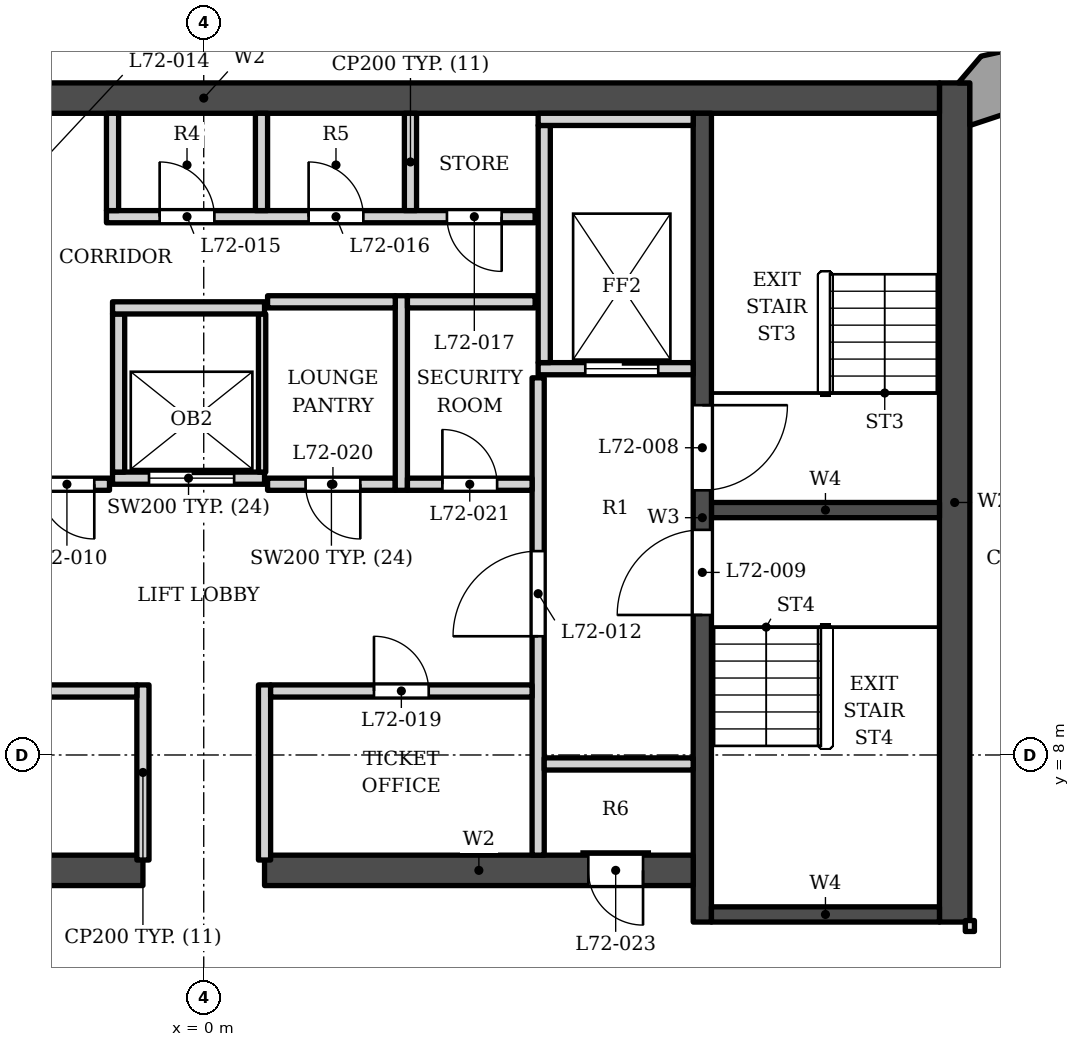
"""IFC4 building model, lengths in metres.
Left out: names, types, materials, properties, quantities, classifications, styles, units other than length and angle.
Written with IfcOpenShell. Run it as: python <this file> out.ifc"""

import sys

from ifc_helpers import new_model, si_unit, direction, frame, frame_2d, origin, place, context, subcontext, project, spatial, polyline, rectangle, outline, extrude, element, fill, save


model = new_model("IFC4")
c1 = context("Model", 3, precision=1e-05, world=origin(), true_north=direction((0.0, 1.0)))
c2 = subcontext(c1, "Body", "Model", "MODEL_VIEW")
j1 = project(units=[si_unit("LENGTHUNIT", "METRE"), si_unit("PLANEANGLEUNIT", "RADIAN")], contexts=[c1])
p1 = place(None, origin())
s1 = spatial("IfcSite", under=j1, at=p1, CompositionType="ELEMENT")
p2 = place(p1, origin())
s2 = spatial("IfcBuilding", under=s1, at=p2, CompositionType="ELEMENT")
p3 = place(p2, frame((0.0, 0.0, 302.5)))
s3 = spatial("IfcBuildingStorey", under=s2, at=p3, CompositionType="ELEMENT", Elevation=302.5)
p4 = place(p3, frame((-12.1, 18.802, 0.0), z_axis=(0.0, 0.0, 1.0), x_axis=(1.0, 0.0, 0.0)))
e1 = element("IfcWall", 1, at=p4, inside=s3, PredefinedType="SHEAR", context=c2, shape_type="SweptSolid", body=[
    extrude(rectangle(XDim=24.2, YDim=0.5, at=frame_2d((12.1, 0.0))), origin(), (0.0, 0.0, 1.0), 8.0),
])
p5 = place(p3, frame((12.35, 5.253, 0.0), z_axis=(0.0, 0.0, 1.0), x_axis=(0.0, 1.0, 0.0)))
e2 = element("IfcWall", 2, at=p5, inside=s3, PredefinedType="SHEAR", context=c2, shape_type="SweptSolid", body=[
    extrude(rectangle(XDim=13.8, YDim=0.5, at=frame_2d((6.9, 0.0))), origin(), (0.0, 0.0, 1.0), 8.0),
])
p6 = place(p3, frame((8.2, 5.253, 0.0), z_axis=(0.0, 0.0, 1.0), x_axis=(0.0, 1.0, 0.0)))
e3 = element("IfcWall", 3, at=p6, inside=s3, PredefinedType="SHEAR", context=c2, shape_type="SweptSolid", body=[
    extrude(rectangle(XDim=13.3, YDim=0.3, at=frame_2d((6.65, 0.0))), origin(), (0.0, 0.0, 1.0), 8.0),
])
p7 = place(p6, frame((7.1, 0.0, 0.0)))
e4 = element("IfcOpeningElement", 4, at=p7, cuts=e3, PredefinedType="OPENING", context=c2, shape_type="SweptSolid", body=[
    extrude(rectangle(XDim=1.4, YDim=2.1, at=frame_2d((0.7, 1.05))), frame((0.0, 0.16, 0.0), z_axis=(0.0, -1.0, 0.0), x_axis=(1.0, 0.0, 0.0)), (0.0, 0.0, 1.0), 0.32),
])
p8 = place(p6, frame((5.05, 0.0, 0.0)))
e5 = element("IfcOpeningElement", 5, at=p8, cuts=e3, PredefinedType="OPENING", context=c2, shape_type="SweptSolid", body=[
    extrude(rectangle(XDim=1.4, YDim=2.1, at=frame_2d((0.7, 1.05))), frame((0.0, 0.16, 0.0), z_axis=(0.0, -1.0, 0.0), x_axis=(1.0, 0.0, 0.0)), (0.0, 0.0, 1.0), 0.32),
])
for number, where, z_axis, x_axis in (
    (6, (8.35, 12.028, 0.0), (0.0, 0.0, 1.0), (1.0, 0.0, 0.0)),
    (7, (8.35, 5.378, 0.0), (0.0, 0.0, 1.0), (1.0, 0.0, 0.0)),
):
    element("IfcWall", number, at=place(p3, frame(where, z_axis=z_axis, x_axis=x_axis)), inside=s3, PredefinedType="SHEAR", context=c2, shape_type="SweptSolid", body=[
        extrude(rectangle(XDim=3.75, YDim=0.25, at=frame_2d((1.875, 0.0))), origin(), (0.0, 0.0, 1.0), 8.0),
    ])
p9 = place(p3, frame((-8.05, 6.103, 0.0), z_axis=(0.0, 0.0, 1.0), x_axis=(1.0, 0.0, 0.0)))
e8 = element("IfcWall", 8, at=p9, inside=s3, PredefinedType="SHEAR", context=c2, shape_type="SweptSolid", body=[
    extrude(rectangle(XDim=7.05, YDim=0.5, at=frame_2d((3.525, 0.0))), origin(), (0.0, 0.0, 1.0), 8.0),
])
p10 = place(p9, frame((0.825, 0.0, 0.0)))
e9 = element("IfcOpeningElement", 9, at=p10, cuts=e8, PredefinedType="OPENING", context=c2, shape_type="SweptSolid", body=[
    extrude(rectangle(XDim=0.9, YDim=2.1, at=frame_2d((0.45, 1.05))), frame((0.0, 0.26, 0.0), z_axis=(0.0, -1.0, 0.0), x_axis=(1.0, 0.0, 0.0)), (0.0, 0.0, 1.0), 0.52),
])
p11 = place(p3, frame((1.0, 6.103, 0.0), z_axis=(0.0, 0.0, 1.0), x_axis=(1.0, 0.0, 0.0)))
e10 = element("IfcWall", 10, at=p11, inside=s3, PredefinedType="SHEAR", context=c2, shape_type="SweptSolid", body=[
    extrude(rectangle(XDim=7.05, YDim=0.5, at=frame_2d((3.525, 0.0))), origin(), (0.0, 0.0, 1.0), 8.0),
])
p12 = place(p11, frame((5.325, 0.0, 0.0)))
e11 = element("IfcOpeningElement", 11, at=p12, cuts=e10, PredefinedType="OPENING", context=c2, shape_type="SweptSolid", body=[
    extrude(rectangle(XDim=0.9, YDim=2.1, at=frame_2d((0.45, 1.05))), frame((0.0, 0.26, 0.0), z_axis=(0.0, -1.0, 0.0), x_axis=(1.0, 0.0, 0.0)), (0.0, 0.0, 1.0), 0.52),
])
p13 = place(p3, origin())
e12 = element("IfcWall", 12, at=p13, inside=s3, PredefinedType="SOLIDWALL", context=c2, shape_type="SweptSolid", body=[
    extrude(outline(polyline([(14.201, 18.883), (14.008, 19.762), (12.784, 19.492), (12.41, 19.052), (12.6, 19.052), (12.6, 18.352), (14.201, 18.883)])), origin(), (0.0, 0.0, 1.0), 7.0),
])
for number, where, z_axis, x_axis in (
    (13, (-1.0, 6.273, 0.0), (0.0, 0.0, 1.0), (0.0, 1.0, 0.0)),
    (14, (1.0, 6.273, 0.0), (0.0, 0.0, 1.0), (0.0, 1.0, 0.0)),
):
    element("IfcWall", number, at=place(p3, frame(where, z_axis=z_axis, x_axis=x_axis)), inside=s3, PredefinedType="PARTITIONING", context=c2, shape_type="SweptSolid", body=[
        extrude(rectangle(XDim=2.88, YDim=0.2, at=frame_2d((1.44, 0.0))), origin(), (0.0, 0.0, 1.0), 7.8),
    ])
p14 = place(p3, frame((5.5, 6.353, 0.0), z_axis=(0.0, 0.0, 1.0), x_axis=(0.0, 1.0, 0.0)))
e15 = element("IfcWall", 15, at=p14, inside=s3, PredefinedType="SOLIDWALL", context=c2, shape_type="SweptSolid", body=[
    extrude(rectangle(XDim=7.85, YDim=0.2, at=frame_2d((3.925, 0.0))), origin(), (0.0, 0.0, 1.0), 7.8),
])
p15 = place(p14, frame((3.6, 0.0, 0.0)))
e16 = element("IfcOpeningElement", 16, at=p15, cuts=e15, PredefinedType="OPENING", context=c2, shape_type="SweptSolid", body=[
    extrude(rectangle(XDim=1.4, YDim=2.1, at=frame_2d((0.7, 1.05))), frame((0.0, 0.11, 0.0), z_axis=(0.0, -1.0, 0.0), x_axis=(1.0, 0.0, 0.0)), (0.0, 0.0, 1.0), 0.22),
])
p16 = place(p3, frame((5.6, 7.853, 0.0), z_axis=(0.0, 0.0, 1.0), x_axis=(1.0, 0.0, 0.0)))
e17 = element("IfcWall", 17, at=p16, inside=s3, PredefinedType="SOLIDWALL", context=c2, shape_type="SweptSolid", body=[
    extrude(rectangle(XDim=2.45, YDim=0.2, at=frame_2d((1.225, 0.0))), origin(), (0.0, 0.0, 1.0), 7.8),
])
p17 = place(p3, frame((-5.4, 9.052, 0.0), z_axis=(0.0, 0.0, 1.0), x_axis=(1.0, 0.0, 0.0)))
e18 = element("IfcWall", 18, at=p17, inside=s3, PredefinedType="PARTITIONING", context=c2, shape_type="SweptSolid", body=[
    extrude(rectangle(XDim=4.3, YDim=0.2, at=frame_2d((2.15, 0.0))), origin(), (0.0, 0.0, 1.0), 7.8),
])
p18 = place(p17, frame((1.7, 0.0, 0.0)))
e19 = element("IfcOpeningElement", 19, at=p18, cuts=e18, PredefinedType="OPENING", context=c2, shape_type="SweptSolid", body=[
    extrude(rectangle(XDim=0.9, YDim=2.1, at=frame_2d((0.45, 1.05))), frame((0.0, 0.11, 0.0), z_axis=(0.0, -1.0, 0.0), x_axis=(1.0, 0.0, 0.0)), (0.0, 0.0, 1.0), 0.22),
])
p19 = place(p3, frame((1.1, 9.052, 0.0), z_axis=(0.0, 0.0, 1.0), x_axis=(1.0, 0.0, 0.0)))
e20 = element("IfcWall", 20, at=p19, inside=s3, PredefinedType="PARTITIONING", context=c2, shape_type="SweptSolid", body=[
    extrude(rectangle(XDim=4.3, YDim=0.2, at=frame_2d((2.15, 0.0))), origin(), (0.0, 0.0, 1.0), 7.8),
])
p20 = place(p19, frame((1.7, 0.0, 0.0)))
e21 = element("IfcOpeningElement", 21, at=p20, cuts=e20, PredefinedType="OPENING", context=c2, shape_type="SweptSolid", body=[
    extrude(rectangle(XDim=0.9, YDim=2.1, at=frame_2d((0.45, 1.05))), frame((0.0, 0.11, 0.0), z_axis=(0.0, -1.0, 0.0), x_axis=(1.0, 0.0, 0.0)), (0.0, 0.0, 1.0), 0.22),
])
p21 = place(p3, frame((-2.95, 12.453, 0.0), z_axis=(0.0, 0.0, 1.0), x_axis=(1.0, 0.0, 0.0)))
e22 = element("IfcWall", 22, at=p21, inside=s3, PredefinedType="SOLIDWALL", context=c2, shape_type="SweptSolid", body=[
    extrude(rectangle(XDim=1.4, YDim=0.2, at=frame_2d((0.7, 0.0))), origin(), (0.0, 0.0, 1.0), 7.8),
])
p22 = place(p21, frame((0.25, 0.0, 0.0)))
e23 = element("IfcOpeningElement", 23, at=p22, cuts=e22, PredefinedType="OPENING", context=c2, shape_type="SweptSolid", body=[
    extrude(rectangle(XDim=0.9, YDim=2.1, at=frame_2d((0.45, 1.05))), frame((0.0, 0.11, 0.0), z_axis=(0.0, -1.0, 0.0), x_axis=(1.0, 0.0, 0.0)), (0.0, 0.0, 1.0), 0.22),
])
p23 = place(p3, frame((1.05, 12.453, 0.0), z_axis=(0.0, 0.0, 1.0), x_axis=(1.0, 0.0, 0.0)))
e24 = element("IfcWall", 24, at=p23, inside=s3, PredefinedType="SOLIDWALL", context=c2, shape_type="SweptSolid", body=[
    extrude(rectangle(XDim=2.1, YDim=0.2, at=frame_2d((1.05, 0.0))), origin(), (0.0, 0.0, 1.0), 7.8),
])
p24 = place(p23, frame((0.625, 0.0, 0.0)))
e25 = element("IfcOpeningElement", 25, at=p24, cuts=e24, PredefinedType="OPENING", context=c2, shape_type="SweptSolid", body=[
    extrude(rectangle(XDim=0.9, YDim=2.1, at=frame_2d((0.45, 1.05))), frame((0.0, 0.11, 0.0), z_axis=(0.0, -1.0, 0.0), x_axis=(1.0, 0.0, 0.0)), (0.0, 0.0, 1.0), 0.22),
])
p25 = place(p3, frame((3.25, 12.353, 0.0), z_axis=(0.0, 0.0, 1.0), x_axis=(0.0, 1.0, 0.0)))
e26 = element("IfcWall", 26, at=p25, inside=s3, PredefinedType="PARTITIONING", context=c2, shape_type="SweptSolid", body=[
    extrude(rectangle(XDim=3.2, YDim=0.2, at=frame_2d((1.6, 0.0))), origin(), (0.0, 0.0, 1.0), 7.8),
])
p26 = place(p3, frame((3.35, 12.453, 0.0), z_axis=(0.0, 0.0, 1.0), x_axis=(1.0, 0.0, 0.0)))
e27 = element("IfcWall", 27, at=p26, inside=s3, PredefinedType="PARTITIONING", context=c2, shape_type="SweptSolid", body=[
    extrude(rectangle(XDim=2.05, YDim=0.2, at=frame_2d((1.025, 0.0))), origin(), (0.0, 0.0, 1.0), 7.8),
])
p27 = place(p26, frame((0.575, 0.0, 0.0)))
e28 = element("IfcOpeningElement", 28, at=p27, cuts=e27, PredefinedType="OPENING", context=c2, shape_type="SweptSolid", body=[
    extrude(rectangle(XDim=0.9, YDim=2.1, at=frame_2d((0.45, 1.05))), frame((0.0, 0.11, 0.0), z_axis=(0.0, -1.0, 0.0), x_axis=(1.0, 0.0, 0.0)), (0.0, 0.0, 1.0), 0.22),
])
p28 = place(p3, frame((-1.5, 12.552, 0.0), z_axis=(0.0, 0.0, 1.0), x_axis=(1.0, 0.0, 0.0)))
e29 = element("IfcWall", 29, at=p28, inside=s3, PredefinedType="SOLIDWALL", context=c2, shape_type="SweptSolid", body=[
    extrude(rectangle(XDim=2.5, YDim=0.2, at=frame_2d((1.25, 0.0))), origin(), (0.0, 0.0, 1.0), 7.8),
])
p29 = place(p28, frame((0.6, 0.0, 0.0)))
e30 = element("IfcOpeningElement", 30, at=p29, cuts=e29, PredefinedType="OPENING", context=c2, shape_type="SweptSolid", body=[
    extrude(rectangle(XDim=1.4, YDim=2.4, at=frame_2d((0.7, 1.2))), frame((0.0, 0.11, 0.0), z_axis=(0.0, -1.0, 0.0), x_axis=(1.0, 0.0, 0.0)), (0.0, 0.0, 1.0), 0.22),
])
p30 = place(p3, frame((-1.4, 12.653, 0.0), z_axis=(0.0, 0.0, 1.0), x_axis=(0.0, 1.0, 0.0)))
e31 = element("IfcWall", 31, at=p30, inside=s3, PredefinedType="SOLIDWALL", context=c2, shape_type="SweptSolid", body=[
    extrude(rectangle(XDim=2.6, YDim=0.2, at=frame_2d((1.3, 0.0))), origin(), (0.0, 0.0, 1.0), 7.8),
])
p31 = place(p3, frame((0.96, 12.653, 0.0), z_axis=(0.0, 0.0, 1.0), x_axis=(0.0, 1.0, 0.0)))
e32 = element("IfcWall", 32, at=p31, inside=s3, PredefinedType="SOLIDWALL", context=c2, shape_type="SweptSolid", body=[
    extrude(rectangle(XDim=2.6, YDim=0.12, at=frame_2d((1.3, 0.0))), origin(), (0.0, 0.0, 1.0), 7.8),
])
p32 = place(p3, frame((5.5, 14.353, 0.0), z_axis=(0.0, 0.0, 1.0), x_axis=(1.0, 0.0, 0.0)))
e33 = element("IfcWall", 33, at=p32, inside=s3, PredefinedType="SOLIDWALL", context=c2, shape_type="SweptSolid", body=[
    extrude(rectangle(XDim=2.55, YDim=0.2, at=frame_2d((1.275, 0.0))), origin(), (0.0, 0.0, 1.0), 7.8),
])
p33 = place(p32, frame((0.775, 0.0, 0.0)))
e34 = element("IfcOpeningElement", 34, at=p33, cuts=e33, PredefinedType="OPENING", context=c2, shape_type="SweptSolid", body=[
    extrude(rectangle(XDim=1.2, YDim=2.1, at=frame_2d((0.6, 1.05))), frame((0.0, 0.11, 0.0), z_axis=(0.0, -1.0, 0.0), x_axis=(1.0, 0.0, 0.0)), (0.0, 0.0, 1.0), 0.22),
])
p34 = place(p3, frame((5.6, 14.453, 0.0), z_axis=(0.0, 0.0, 1.0), x_axis=(0.0, 1.0, 0.0)))
e35 = element("IfcWall", 35, at=p34, inside=s3, PredefinedType="SOLIDWALL", context=c2, shape_type="SweptSolid", body=[
    extrude(rectangle(XDim=3.9, YDim=0.2, at=frame_2d((1.95, 0.0))), origin(), (0.0, 0.0, 1.0), 7.8),
])
p35 = place(p3, frame((-1.5, 15.353, 0.0), z_axis=(0.0, 0.0, 1.0), x_axis=(1.0, 0.0, 0.0)))
e36 = element("IfcWall", 36, at=p35, inside=s3, PredefinedType="SOLIDWALL", context=c2, shape_type="SweptSolid", body=[
    extrude(rectangle(XDim=2.5, YDim=0.2, at=frame_2d((1.25, 0.0))), origin(), (0.0, 0.0, 1.0), 7.8),
])
for number, where, z_axis, x_axis in (
    (37, (1.05, 15.453, 0.0), (0.0, 0.0, 1.0), (1.0, 0.0, 0.0)),
    (38, (3.35, 15.453, 0.0), (0.0, 0.0, 1.0), (1.0, 0.0, 0.0)),
):
    element("IfcWall", number, at=place(p3, frame(where, z_axis=z_axis, x_axis=x_axis)), inside=s3, PredefinedType="SOLIDWALL", context=c2, shape_type="SweptSolid", body=[
        extrude(rectangle(XDim=2.1, YDim=0.2, at=frame_2d((1.05, 0.0))), origin(), (0.0, 0.0, 1.0), 7.8),
    ])
p36 = place(p3, frame((-1.6, 16.853, 0.0), z_axis=(0.0, 0.0, 1.0), x_axis=(1.0, 0.0, 0.0)))
e39 = element("IfcWall", 39, at=p36, inside=s3, PredefinedType="SOLIDWALL", context=c2, shape_type="SweptSolid", body=[
    extrude(rectangle(XDim=7.05, YDim=0.2, at=frame_2d((3.525, 0.0))), origin(), (0.0, 0.0, 1.0), 7.8),
])
p37 = place(p36, frame((0.875, 0.0, 0.0)))
e40 = element("IfcOpeningElement", 40, at=p37, cuts=e39, PredefinedType="OPENING", context=c2, shape_type="SweptSolid", body=[
    extrude(rectangle(XDim=0.9, YDim=2.1, at=frame_2d((0.45, 1.05))), frame((0.0, 0.11, 0.0), z_axis=(0.0, -1.0, 0.0), x_axis=(1.0, 0.0, 0.0)), (0.0, 0.0, 1.0), 0.22),
])
p38 = place(p36, frame((3.325, 0.0, 0.0)))
e41 = element("IfcOpeningElement", 41, at=p38, cuts=e39, PredefinedType="OPENING", context=c2, shape_type="SweptSolid", body=[
    extrude(rectangle(XDim=0.9, YDim=2.1, at=frame_2d((0.45, 1.05))), frame((0.0, 0.11, 0.0), z_axis=(0.0, -1.0, 0.0), x_axis=(1.0, 0.0, 0.0)), (0.0, 0.0, 1.0), 0.22),
])
p39 = place(p36, frame((5.6, 0.0, 0.0)))
e42 = element("IfcOpeningElement", 42, at=p39, cuts=e39, PredefinedType="OPENING", context=c2, shape_type="SweptSolid", body=[
    extrude(rectangle(XDim=0.9, YDim=2.1, at=frame_2d((0.45, 1.05))), frame((0.0, 0.11, 0.0), z_axis=(0.0, -1.0, 0.0), x_axis=(1.0, 0.0, 0.0)), (0.0, 0.0, 1.0), 0.22),
])
for number, where, z_axis, x_axis in (
    (43, (-1.5, 16.953, 0.0), (0.0, 0.0, 1.0), (0.0, 1.0, 0.0)),
    (44, (0.95, 16.953, 0.0), (0.0, 0.0, 1.0), (0.0, 1.0, 0.0)),
    (45, (3.4, 16.953, 0.0), (0.0, 0.0, 1.0), (0.0, 1.0, 0.0)),
):
    element("IfcWall", number, at=place(p3, frame(where, z_axis=z_axis, x_axis=x_axis)), inside=s3, PredefinedType="PARTITIONING", context=c2, shape_type="SweptSolid", body=[
        extrude(rectangle(XDim=1.6, YDim=0.2, at=frame_2d((0.8, 0.0))), origin(), (0.0, 0.0, 1.0), 7.8),
    ])
p40 = place(p3, frame((5.5, 18.453, 0.0), z_axis=(0.0, 0.0, 1.0), x_axis=(1.0, 0.0, 0.0)))
e46 = element("IfcWall", 46, at=p40, inside=s3, PredefinedType="SOLIDWALL", context=c2, shape_type="SweptSolid", body=[
    extrude(rectangle(XDim=2.55, YDim=0.2, at=frame_2d((1.275, 0.0))), origin(), (0.0, 0.0, 1.0), 7.8),
])
p41 = place(p3, frame((12.6, 5.098, 0.0), z_axis=(0.0, 0.0, 1.0), x_axis=(0.0, 1.0, 0.0)))
e47 = element("IfcWall", 47, at=p41, inside=s3, PredefinedType="PARTITIONING", context=c2, shape_type="SweptSolid", body=[
    extrude(rectangle(XDim=0.18, YDim=0.15, at=frame_2d((0.09, 0.0))), origin(), (0.0, 0.0, 1.0), 7.8),
])
p42 = place(p29, origin())
e48 = element("IfcDoor", 48, at=p42, inside=s3, OperationType="DOUBLE_DOOR_SLIDING", PredefinedType="DOOR", context=c2, shape_type="SweptSolid", body=[
    extrude(rectangle(XDim=1.4, YDim=2.4, at=frame_2d((0.7, 1.2))), frame((0.0, 0.025, 0.0), z_axis=(0.0, -1.0, 0.0), x_axis=(1.0, 0.0, 0.0)), (0.0, 0.0, 1.0), 0.05),
])
fill(e30, e48)
p43 = place(p33, origin())
e49 = element("IfcDoor", 49, at=p43, inside=s3, OperationType="DOUBLE_DOOR_SLIDING", PredefinedType="DOOR", context=c2, shape_type="SweptSolid", body=[
    extrude(rectangle(XDim=1.2, YDim=2.1, at=frame_2d((0.6, 1.05))), frame((0.0, 0.025, 0.0), z_axis=(0.0, -1.0, 0.0), x_axis=(1.0, 0.0, 0.0)), (0.0, 0.0, 1.0), 0.05),
])
fill(e34, e49)
p44 = place(p7, origin())
e50 = element("IfcDoor", 50, at=p44, inside=s3, OperationType="SINGLE_SWING_RIGHT", PredefinedType="DOOR", context=c2, shape_type="SweptSolid", body=[
    extrude(rectangle(XDim=1.4, YDim=2.1, at=frame_2d((0.7, 1.05))), frame((0.0, 0.025, 0.0), z_axis=(0.0, -1.0, 0.0), x_axis=(1.0, 0.0, 0.0)), (0.0, 0.0, 1.0), 0.05),
])
fill(e4, e50)
p45 = place(p8, origin())
e51 = element("IfcDoor", 51, at=p45, inside=s3, OperationType="SINGLE_SWING_LEFT", PredefinedType="DOOR", context=c2, shape_type="SweptSolid", body=[
    extrude(rectangle(XDim=1.4, YDim=2.1, at=frame_2d((0.7, 1.05))), frame((0.0, 0.025, 0.0), z_axis=(0.0, -1.0, 0.0), x_axis=(1.0, 0.0, 0.0)), (0.0, 0.0, 1.0), 0.05),
])
fill(e5, e51)
p46 = place(p22, origin())
e52 = element("IfcDoor", 52, at=p46, inside=s3, OperationType="SINGLE_SWING_RIGHT", PredefinedType="DOOR", context=c2, shape_type="SweptSolid", body=[
    extrude(rectangle(XDim=0.9, YDim=2.1, at=frame_2d((0.45, 1.05))), frame((0.0, 0.025, 0.0), z_axis=(0.0, -1.0, 0.0), x_axis=(1.0, 0.0, 0.0)), (0.0, 0.0, 1.0), 0.05),
])
fill(e23, e52)
p47 = place(p15, origin())
e53 = element("IfcDoor", 53, at=p47, inside=s3, OperationType="SINGLE_SWING_LEFT", PredefinedType="DOOR", context=c2, shape_type="SweptSolid", body=[
    extrude(rectangle(XDim=1.4, YDim=2.1, at=frame_2d((0.7, 1.05))), frame((0.0, 0.025, 0.0), z_axis=(0.0, -1.0, 0.0), x_axis=(1.0, 0.0, 0.0)), (0.0, 0.0, 1.0), 0.05),
])
fill(e16, e53)
p48 = place(p37, origin())
e54 = element("IfcDoor", 54, at=p48, inside=s3, OperationType="SINGLE_SWING_LEFT", PredefinedType="DOOR", context=c2, shape_type="SweptSolid", body=[
    extrude(rectangle(XDim=0.9, YDim=2.1, at=frame_2d((0.45, 1.05))), frame((0.0, 0.025, 0.0), z_axis=(0.0, -1.0, 0.0), x_axis=(1.0, 0.0, 0.0)), (0.0, 0.0, 1.0), 0.05),
])
fill(e40, e54)
p49 = place(p38, origin())
e55 = element("IfcDoor", 55, at=p49, inside=s3, OperationType="SINGLE_SWING_LEFT", PredefinedType="DOOR", context=c2, shape_type="SweptSolid", body=[
    extrude(rectangle(XDim=0.9, YDim=2.1, at=frame_2d((0.45, 1.05))), frame((0.0, 0.025, 0.0), z_axis=(0.0, -1.0, 0.0), x_axis=(1.0, 0.0, 0.0)), (0.0, 0.0, 1.0), 0.05),
])
fill(e41, e55)
p50 = place(p39, origin())
e56 = element("IfcDoor", 56, at=p50, inside=s3, OperationType="SINGLE_SWING_RIGHT", PredefinedType="DOOR", context=c2, shape_type="SweptSolid", body=[
    extrude(rectangle(XDim=0.9, YDim=2.1, at=frame_2d((0.45, 1.05))), frame((0.0, 0.025, 0.0), z_axis=(0.0, -1.0, 0.0), x_axis=(1.0, 0.0, 0.0)), (0.0, 0.0, 1.0), 0.05),
])
fill(e42, e56)
p51 = place(p20, origin())
e57 = element("IfcDoor", 57, at=p51, inside=s3, OperationType="SINGLE_SWING_LEFT", PredefinedType="DOOR", context=c2, shape_type="SweptSolid", body=[
    extrude(rectangle(XDim=0.9, YDim=2.1, at=frame_2d((0.45, 1.05))), frame((0.0, 0.025, 0.0), z_axis=(0.0, -1.0, 0.0), x_axis=(1.0, 0.0, 0.0)), (0.0, 0.0, 1.0), 0.05),
])
fill(e21, e57)
p52 = place(p24, origin())
e58 = element("IfcDoor", 58, at=p52, inside=s3, OperationType="SINGLE_SWING_RIGHT", PredefinedType="DOOR", context=c2, shape_type="SweptSolid", body=[
    extrude(rectangle(XDim=0.9, YDim=2.1, at=frame_2d((0.45, 1.05))), frame((0.0, 0.025, 0.0), z_axis=(0.0, -1.0, 0.0), x_axis=(1.0, 0.0, 0.0)), (0.0, 0.0, 1.0), 0.05),
])
fill(e25, e58)
p53 = place(p27, origin())
e59 = element("IfcDoor", 59, at=p53, inside=s3, OperationType="SINGLE_SWING_LEFT", PredefinedType="DOOR", context=c2, shape_type="SweptSolid", body=[
    extrude(rectangle(XDim=0.9, YDim=2.1, at=frame_2d((0.45, 1.05))), frame((0.0, 0.025, 0.0), z_axis=(0.0, -1.0, 0.0), x_axis=(1.0, 0.0, 0.0)), (0.0, 0.0, 1.0), 0.05),
])
fill(e28, e59)
p54 = place(p12, origin())
e60 = element("IfcDoor", 60, at=p54, inside=s3, OperationType="SINGLE_SWING_RIGHT", PredefinedType="DOOR", context=c2, shape_type="SweptSolid", body=[
    extrude(rectangle(XDim=0.9, YDim=2.1, at=frame_2d((0.45, 1.05))), frame((0.0, 0.025, 0.0), z_axis=(0.0, -1.0, 0.0), x_axis=(1.0, 0.0, 0.0)), (0.0, 0.0, 1.0), 0.05),
])
fill(e11, e60)
save(model, sys.argv[1])
